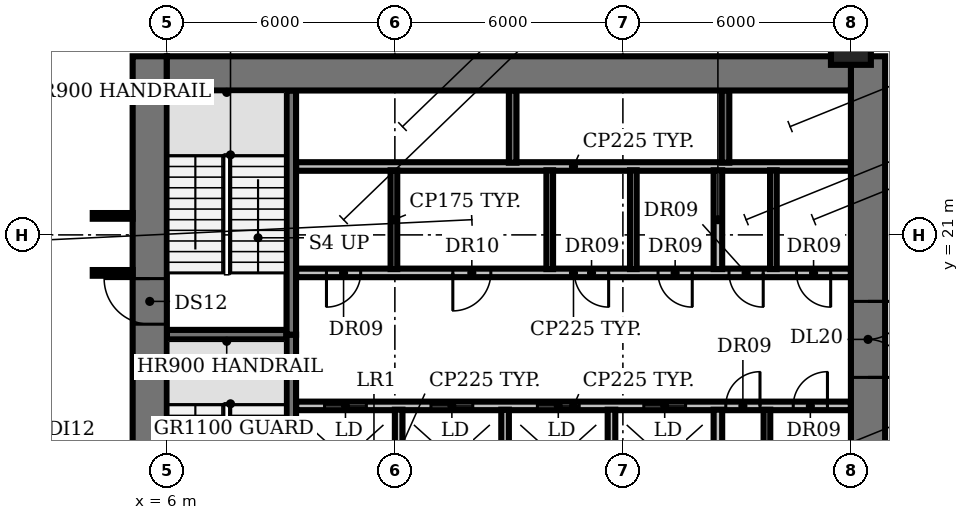
"""IFC4 building model, lengths in metres.
Left out: names, types, materials, properties, quantities, classifications, styles, units other than length and angle.
Written with IfcOpenShell. Run it as: python <this file> out.ifc"""

import sys

from ifc_helpers import new_model, si_unit, direction, frame, frame_2d, origin, origin_2d, place, context, subcontext, project, spatial, rectangle, circle, extrude, element, fill, save


model = new_model("IFC4")
c1 = context("Model", 3, precision=1e-05, world=origin(), true_north=direction((0.0, 1.0)))
c2 = subcontext(c1, "Body", "Model", "MODEL_VIEW")
j1 = project(units=[si_unit("LENGTHUNIT", "METRE"), si_unit("PLANEANGLEUNIT", "RADIAN")], contexts=[c1])
p1 = place(None, origin())
s1 = spatial("IfcSite", under=j1, at=p1, CompositionType="ELEMENT")
p2 = place(p1, origin())
s2 = spatial("IfcBuilding", under=s1, at=p2, CompositionType="ELEMENT")
p3 = place(p2, frame((0.0, 0.0, 66.8)))
s3 = spatial("IfcBuildingStorey", under=s2, at=p3, CompositionType="ELEMENT", Elevation=66.8)
p4 = place(p3, frame((24.0, 26.0, 0.0), z_axis=(0.0, 0.0, 1.0), x_axis=(1.0, 0.0, 0.0)))
e1 = element("IfcColumn", 1, at=p4, inside=s3, PredefinedType="COLUMN", context=c2, shape_type="SweptSolid", body=[
    extrude(circle(Radius=0.525, at=origin_2d()), origin(), (0.0, 0.0, 1.0), 3.85),
])
p5 = place(p3, frame((9.4, 16.5, 0.0), z_axis=(0.0, 0.0, 1.0), x_axis=(1.0, 0.0, 0.0)))
e2 = element("IfcWall", 2, at=p5, inside=s3, PredefinedType="PARTITIONING", context=c2, shape_type="SweptSolid", body=[
    extrude(rectangle(XDim=14.6, YDim=0.225, at=frame_2d((7.3, 0.0))), origin(), (0.0, 0.0, 1.0), 3.85),
])
p6 = place(p5, frame((0.75, 0.0, 0.0)))
e3 = element("IfcOpeningElement", 3, at=p6, cuts=e2, PredefinedType="OPENING", context=c2, shape_type="SweptSolid", body=[
    extrude(rectangle(XDim=1.1, YDim=2.1, at=frame_2d((0.55, 1.05))), frame((0.0, 0.123, 0.0), z_axis=(0.0, -1.0, 0.0), x_axis=(1.0, 0.0, 0.0)), (0.0, 0.0, 1.0), 0.245),
])
p7 = place(p5, frame((3.55, 0.0, 0.0)))
e4 = element("IfcOpeningElement", 4, at=p7, cuts=e2, PredefinedType="OPENING", context=c2, shape_type="SweptSolid", body=[
    extrude(rectangle(XDim=1.1, YDim=2.1, at=frame_2d((0.55, 1.05))), frame((0.0, 0.123, 0.0), z_axis=(0.0, -1.0, 0.0), x_axis=(1.0, 0.0, 0.0)), (0.0, 0.0, 1.0), 0.245),
])
p8 = place(p5, frame((6.35, 0.0, 0.0)))
e5 = element("IfcOpeningElement", 5, at=p8, cuts=e2, PredefinedType="OPENING", context=c2, shape_type="SweptSolid", body=[
    extrude(rectangle(XDim=1.1, YDim=2.1, at=frame_2d((0.55, 1.05))), frame((0.0, 0.123, 0.0), z_axis=(0.0, -1.0, 0.0), x_axis=(1.0, 0.0, 0.0)), (0.0, 0.0, 1.0), 0.245),
])
p9 = place(p5, frame((9.15, 0.0, 0.0)))
e6 = element("IfcOpeningElement", 6, at=p9, cuts=e2, PredefinedType="OPENING", context=c2, shape_type="SweptSolid", body=[
    extrude(rectangle(XDim=1.1, YDim=2.1, at=frame_2d((0.55, 1.05))), frame((0.0, 0.123, 0.0), z_axis=(0.0, -1.0, 0.0), x_axis=(1.0, 0.0, 0.0)), (0.0, 0.0, 1.0), 0.245),
])
p10 = place(p5, frame((11.308, 0.0, 0.0)))
e7 = element("IfcOpeningElement", 7, at=p10, cuts=e2, PredefinedType="OPENING", context=c2, shape_type="SweptSolid", body=[
    extrude(rectangle(XDim=0.9, YDim=2.1, at=frame_2d((0.45, 1.05))), frame((0.0, 0.123, 0.0), z_axis=(0.0, -1.0, 0.0), x_axis=(1.0, 0.0, 0.0)), (0.0, 0.0, 1.0), 0.245),
])
p11 = place(p5, frame((13.083, 0.0, 0.0)))
e8 = element("IfcOpeningElement", 8, at=p11, cuts=e2, PredefinedType="OPENING", context=c2, shape_type="SweptSolid", body=[
    extrude(rectangle(XDim=0.9, YDim=2.1, at=frame_2d((0.45, 1.05))), frame((0.0, 0.123, 0.0), z_axis=(0.0, -1.0, 0.0), x_axis=(1.0, 0.0, 0.0)), (0.0, 0.0, 1.0), 0.245),
])
p12 = place(p3, frame((6.0, 18.375, 0.0), z_axis=(0.0, 0.0, 1.0), x_axis=(1.0, 0.0, 0.0)))
e9 = element("IfcWall", 9, at=p12, inside=s3, PredefinedType="SHEAR", context=c2, shape_type="SweptSolid", body=[
    extrude(rectangle(XDim=3.15, YDim=0.25, at=frame_2d((1.575, 0.0))), origin(), (0.0, 0.0, 1.0), 3.85),
])
p13 = place(p3, frame((24.0, 20.0, 0.0), z_axis=(0.0, 0.0, 1.0), x_axis=(-1.0, 0.0, 0.0)))
e10 = element("IfcWall", 10, at=p13, inside=s3, PredefinedType="PARTITIONING", context=c2, shape_type="SweptSolid", body=[
    extrude(rectangle(XDim=14.6, YDim=0.225, at=frame_2d((7.3, 0.0))), origin(), (0.0, 0.0, 1.0), 3.85),
])
p14 = place(p13, frame((12.9, 0.0, 0.0)))
e11 = element("IfcOpeningElement", 11, at=p14, cuts=e10, PredefinedType="OPENING", context=c2, shape_type="SweptSolid", body=[
    extrude(rectangle(XDim=0.9, YDim=2.1, at=frame_2d((0.45, 1.05))), frame((0.0, 0.123, 0.0), z_axis=(0.0, -1.0, 0.0), x_axis=(1.0, 0.0, 0.0)), (0.0, 0.0, 1.0), 0.245),
])
p15 = place(p13, frame((9.475, 0.0, 0.0)))
e12 = element("IfcOpeningElement", 12, at=p15, cuts=e10, PredefinedType="OPENING", context=c2, shape_type="SweptSolid", body=[
    extrude(rectangle(XDim=1.0, YDim=2.1, at=frame_2d((0.5, 1.05))), frame((0.0, 0.123, 0.0), z_axis=(0.0, -1.0, 0.0), x_axis=(1.0, 0.0, 0.0)), (0.0, 0.0, 1.0), 0.245),
])
p16 = place(p13, frame((6.375, 0.0, 0.0)))
e13 = element("IfcOpeningElement", 13, at=p16, cuts=e10, PredefinedType="OPENING", context=c2, shape_type="SweptSolid", body=[
    extrude(rectangle(XDim=0.9, YDim=2.1, at=frame_2d((0.45, 1.05))), frame((0.0, 0.123, 0.0), z_axis=(0.0, -1.0, 0.0), x_axis=(1.0, 0.0, 0.0)), (0.0, 0.0, 1.0), 0.245),
])
p17 = place(p13, frame((4.175, 0.0, 0.0)))
e14 = element("IfcOpeningElement", 14, at=p17, cuts=e10, PredefinedType="OPENING", context=c2, shape_type="SweptSolid", body=[
    extrude(rectangle(XDim=0.9, YDim=2.1, at=frame_2d((0.45, 1.05))), frame((0.0, 0.123, 0.0), z_axis=(0.0, -1.0, 0.0), x_axis=(1.0, 0.0, 0.0)), (0.0, 0.0, 1.0), 0.245),
])
p18 = place(p13, frame((2.308, 0.0, 0.0)))
e15 = element("IfcOpeningElement", 15, at=p18, cuts=e10, PredefinedType="OPENING", context=c2, shape_type="SweptSolid", body=[
    extrude(rectangle(XDim=0.9, YDim=2.1, at=frame_2d((0.45, 1.05))), frame((0.0, 0.123, 0.0), z_axis=(0.0, -1.0, 0.0), x_axis=(1.0, 0.0, 0.0)), (0.0, 0.0, 1.0), 0.245),
])
p19 = place(p13, frame((0.532, 0.0, 0.0)))
e16 = element("IfcOpeningElement", 16, at=p19, cuts=e10, PredefinedType="OPENING", context=c2, shape_type="SweptSolid", body=[
    extrude(rectangle(XDim=0.9, YDim=2.1, at=frame_2d((0.45, 1.05))), frame((0.0, 0.123, 0.0), z_axis=(0.0, -1.0, 0.0), x_axis=(1.0, 0.0, 0.0)), (0.0, 0.0, 1.0), 0.245),
])
p20 = place(p3, frame((9.4, 22.8, 0.0), z_axis=(0.0, 0.0, 1.0), x_axis=(1.0, 0.0, 0.0)))
e17 = element("IfcWall", 17, at=p20, inside=s3, PredefinedType="PARTITIONING", context=c2, shape_type="SweptSolid", body=[
    extrude(rectangle(XDim=14.6, YDim=0.225, at=frame_2d((7.3, 0.0))), origin(), (0.0, 0.0, 1.0), 3.85),
])
p21 = place(p3, frame((9.275, 18.375, 0.0), z_axis=(0.0, 0.0, 1.0), x_axis=(0.0, -1.0, 0.0)))
e18 = element("IfcWall", 18, at=p21, inside=s3, PredefinedType="SHEAR", context=c2, shape_type="SweptSolid", body=[
    extrude(rectangle(XDim=6.55, YDim=0.25, at=frame_2d((3.275, 0.0))), origin(), (0.0, 0.0, 1.0), 3.85),
])
p22 = place(p21, frame((5.075, 0.0, 0.0)))
e19 = element("IfcOpeningElement", 19, at=p22, cuts=e18, PredefinedType="OPENING", context=c2, shape_type="SweptSolid", body=[
    extrude(rectangle(XDim=1.0, YDim=2.1, at=frame_2d((0.5, 1.05))), frame((0.0, 0.135, 0.0), z_axis=(0.0, -1.0, 0.0), x_axis=(1.0, 0.0, 0.0)), (0.0, 0.0, 1.0), 0.27),
])
p23 = place(p3, frame((9.275, 18.375, 0.0), z_axis=(0.0, 0.0, 1.0), x_axis=(0.0, 1.0, 0.0)))
e20 = element("IfcWall", 20, at=p23, inside=s3, PredefinedType="SHEAR", context=c2, shape_type="SweptSolid", body=[
    extrude(rectangle(XDim=6.425, YDim=0.25, at=frame_2d((3.212, 0.0))), origin(), (0.0, 0.0, 1.0), 3.85),
])
p24 = place(p3, frame((11.975, 20.1, 0.0), z_axis=(0.0, 0.0, 1.0), x_axis=(0.0, 1.0, 0.0)))
e21 = element("IfcWall", 21, at=p24, inside=s3, PredefinedType="PARTITIONING", context=c2, shape_type="SweptSolid", body=[
    extrude(rectangle(XDim=2.6, YDim=0.175, at=frame_2d((1.3, 0.0))), origin(), (0.0, 0.0, 1.0), 3.85),
])
for number, where, z_axis, x_axis in (
    (22, (12.1, 13.8, 0.0), (0.0, 0.0, 1.0), (0.0, 1.0, 0.0)),
    (23, (14.9, 13.8, 0.0), (0.0, 0.0, 1.0), (0.0, 1.0, 0.0)),
):
    element("IfcWall", number, at=place(p3, frame(where, z_axis=z_axis, x_axis=x_axis)), inside=s3, PredefinedType="SOLIDWALL", context=c2, shape_type="SweptSolid", body=[
        extrude(rectangle(XDim=2.6, YDim=0.2, at=frame_2d((1.3, 0.0))), origin(), (0.0, 0.0, 1.0), 3.85),
    ])
p25 = place(p3, frame((15.1, 22.9, 0.0), z_axis=(0.0, 0.0, 1.0), x_axis=(0.0, 1.0, 0.0)))
e24 = element("IfcWall", 24, at=p25, inside=s3, PredefinedType="SHEAR", context=c2, shape_type="SweptSolid", body=[
    extrude(rectangle(XDim=1.9, YDim=0.2, at=frame_2d((0.95, 0.0))), origin(), (0.0, 0.0, 1.0), 3.85),
])
p26 = place(p3, frame((16.075, 20.1, 0.0), z_axis=(0.0, 0.0, 1.0), x_axis=(0.0, 1.0, 0.0)))
e25 = element("IfcWall", 25, at=p26, inside=s3, PredefinedType="PARTITIONING", context=c2, shape_type="SweptSolid", body=[
    extrude(rectangle(XDim=2.6, YDim=0.175, at=frame_2d((1.3, 0.0))), origin(), (0.0, 0.0, 1.0), 3.85),
])
p27 = place(p3, frame((17.7, 13.8, 0.0), z_axis=(0.0, 0.0, 1.0), x_axis=(0.0, 1.0, 0.0)))
e26 = element("IfcWall", 26, at=p27, inside=s3, PredefinedType="SOLIDWALL", context=c2, shape_type="SweptSolid", body=[
    extrude(rectangle(XDim=2.6, YDim=0.2, at=frame_2d((1.3, 0.0))), origin(), (0.0, 0.0, 1.0), 3.85),
])
p28 = place(p3, frame((18.275, 20.1, 0.0), z_axis=(0.0, 0.0, 1.0), x_axis=(0.0, 1.0, 0.0)))
e27 = element("IfcWall", 27, at=p28, inside=s3, PredefinedType="PARTITIONING", context=c2, shape_type="SweptSolid", body=[
    extrude(rectangle(XDim=2.6, YDim=0.175, at=frame_2d((1.3, 0.0))), origin(), (0.0, 0.0, 1.0), 3.85),
])
for number, where, z_axis, x_axis in (
    (28, (20.5, 13.8, 0.0), (0.0, 0.0, 1.0), (0.0, 1.0, 0.0)),
    (29, (20.5, 20.1, 0.0), (0.0, 0.0, 1.0), (0.0, 1.0, 0.0)),
):
    element("IfcWall", number, at=place(p3, frame(where, z_axis=z_axis, x_axis=x_axis)), inside=s3, PredefinedType="PARTITIONING", context=c2, shape_type="SweptSolid", body=[
        extrude(rectangle(XDim=2.6, YDim=0.225, at=frame_2d((1.3, 0.0))), origin(), (0.0, 0.0, 1.0), 3.85),
    ])
p29 = place(p3, frame((20.7, 22.9, 0.0), z_axis=(0.0, 0.0, 1.0), x_axis=(0.0, 1.0, 0.0)))
e30 = element("IfcWall", 30, at=p29, inside=s3, PredefinedType="SHEAR", context=c2, shape_type="SweptSolid", body=[
    extrude(rectangle(XDim=1.9, YDim=0.2, at=frame_2d((0.95, 0.0))), origin(), (0.0, 0.0, 1.0), 3.85),
])
for number, where, z_axis, x_axis in (
    (31, (21.79, 13.8, 0.0), (0.0, 0.0, 1.0), (0.0, 1.0, 0.0)),
    (32, (21.96, 20.1, 0.0), (0.0, 0.0, 1.0), (0.0, 1.0, 0.0)),
):
    element("IfcWall", number, at=place(p3, frame(where, z_axis=z_axis, x_axis=x_axis)), inside=s3, PredefinedType="PARTITIONING", context=c2, shape_type="SweptSolid", body=[
        extrude(rectangle(XDim=2.6, YDim=0.175, at=frame_2d((1.3, 0.0))), origin(), (0.0, 0.0, 1.0), 3.85),
    ])
p30 = place(p3, frame((5.55, 4.5, 0.0), z_axis=(0.0, 0.0, 1.0), x_axis=(0.0, 1.0, 0.0)))
e33 = element("IfcWall", 33, at=p30, inside=s3, PredefinedType="SHEAR", context=c2, shape_type="SweptSolid", body=[
    extrude(rectangle(XDim=21.2, YDim=0.9, at=frame_2d((10.6, 0.0))), origin(), (0.0, 0.0, 1.0), 3.85),
])
p31 = place(p30, frame((1.15, 0.0, 0.0)))
e34 = element("IfcOpeningElement", 34, at=p31, cuts=e33, PredefinedType="OPENING", context=c2, shape_type="SweptSolid", body=[
    extrude(rectangle(XDim=1.5, YDim=2.1, at=frame_2d((0.75, 1.05))), frame((0.0, 0.46, 0.0), z_axis=(0.0, -1.0, 0.0), x_axis=(1.0, 0.0, 0.0)), (0.0, 0.0, 1.0), 0.92),
])
p32 = place(p30, frame((7.6, 0.0, 0.0)))
e35 = element("IfcOpeningElement", 35, at=p32, cuts=e33, PredefinedType="OPENING", context=c2, shape_type="SweptSolid", body=[
    extrude(rectangle(XDim=1.2, YDim=2.1, at=frame_2d((0.6, 1.05))), frame((0.0, 0.46, 0.0), z_axis=(0.0, -1.0, 0.0), x_axis=(1.0, 0.0, 0.0)), (0.0, 0.0, 1.0), 0.92),
])
p33 = place(p30, frame((14.15, 0.0, 0.0)))
e36 = element("IfcOpeningElement", 36, at=p33, cuts=e33, PredefinedType="OPENING", context=c2, shape_type="SweptSolid", body=[
    extrude(rectangle(XDim=1.2, YDim=2.1, at=frame_2d((0.6, 1.05))), frame((0.0, 0.46, 0.0), z_axis=(0.0, -1.0, 0.0), x_axis=(1.0, 0.0, 0.0)), (0.0, 0.0, 1.0), 0.92),
])
p34 = place(p3, frame((24.45, 25.7, 0.0), z_axis=(0.0, 0.0, 1.0), x_axis=(0.0, -1.0, 0.0)))
e37 = element("IfcWall", 37, at=p34, inside=s3, PredefinedType="SHEAR", context=c2, shape_type="SweptSolid", body=[
    extrude(rectangle(XDim=21.2, YDim=0.9, at=frame_2d((10.6, 0.0))), origin(), (0.0, 0.0, 1.0), 3.85),
])
p35 = place(p34, frame((18.55, 0.0, 0.0)))
e38 = element("IfcOpeningElement", 38, at=p35, cuts=e37, PredefinedType="OPENING", context=c2, shape_type="SweptSolid", body=[
    extrude(rectangle(XDim=1.5, YDim=2.1, at=frame_2d((0.75, 1.05))), frame((0.0, 0.46, 0.0), z_axis=(0.0, -1.0, 0.0), x_axis=(1.0, 0.0, 0.0)), (0.0, 0.0, 1.0), 0.92),
])
p36 = place(p34, frame((12.45, 0.0, 0.0)))
e39 = element("IfcOpeningElement", 39, at=p36, cuts=e37, PredefinedType="OPENING", context=c2, shape_type="SweptSolid", body=[
    extrude(rectangle(XDim=0.9, YDim=2.1, at=frame_2d((0.45, 1.05))), frame((0.0, 0.46, 0.0), z_axis=(0.0, -1.0, 0.0), x_axis=(1.0, 0.0, 0.0)), (0.0, 0.0, 1.0), 0.92),
])
p37 = place(p34, frame((6.45, 0.0, 0.0)))
e40 = element("IfcOpeningElement", 40, at=p37, cuts=e37, PredefinedType="OPENING", context=c2, shape_type="SweptSolid", body=[
    extrude(rectangle(XDim=2.0, YDim=2.1, at=frame_2d((1.0, 1.05))), frame((0.0, 0.46, 0.0), z_axis=(0.0, -1.0, 0.0), x_axis=(1.0, 0.0, 0.0)), (0.0, 0.0, 1.0), 0.92),
])
p38 = place(p3, frame((6.0, 25.25, 0.0), z_axis=(0.0, 0.0, 1.0), x_axis=(1.0, 0.0, 0.0)))
e41 = element("IfcWall", 41, at=p38, inside=s3, PredefinedType="SHEAR", context=c2, shape_type="SweptSolid", body=[
    extrude(rectangle(XDim=18.0, YDim=0.9, at=frame_2d((9.0, 0.0))), origin(), (0.0, 0.0, 1.0), 3.85),
])
for number, where, z_axis, x_axis in (
    (42, (4.05, 20.0, 0.0), (0.0, 0.0, 1.0), (1.0, 0.0, 0.0)),
    (43, (4.05, 21.5, 0.0), (0.0, 0.0, 1.0), (1.0, 0.0, 0.0)),
):
    element("IfcWall", number, at=place(p3, frame(where, z_axis=z_axis, x_axis=x_axis)), inside=s3, PredefinedType="PARTITIONING", context=c2, shape_type="SweptSolid", body=[
        extrude(rectangle(XDim=1.05, YDim=0.15, at=frame_2d((0.525, 0.0))), origin(), (0.0, 0.0, 1.0), 2.83),
    ])
p39 = place(p6, origin())
e44 = element("IfcDoor", 44, at=p39, inside=s3, OperationType="DOUBLE_DOOR_SLIDING", PredefinedType="DOOR", context=c2, shape_type="SweptSolid", body=[
    extrude(rectangle(XDim=1.1, YDim=2.1, at=frame_2d((0.55, 1.05))), frame((0.0, 0.025, 0.0), z_axis=(0.0, -1.0, 0.0), x_axis=(1.0, 0.0, 0.0)), (0.0, 0.0, 1.0), 0.05),
])
fill(e3, e44)
p40 = place(p7, origin())
e45 = element("IfcDoor", 45, at=p40, inside=s3, OperationType="DOUBLE_DOOR_SLIDING", PredefinedType="DOOR", context=c2, shape_type="SweptSolid", body=[
    extrude(rectangle(XDim=1.1, YDim=2.1, at=frame_2d((0.55, 1.05))), frame((0.0, 0.025, 0.0), z_axis=(0.0, -1.0, 0.0), x_axis=(1.0, 0.0, 0.0)), (0.0, 0.0, 1.0), 0.05),
])
fill(e4, e45)
p41 = place(p8, origin())
e46 = element("IfcDoor", 46, at=p41, inside=s3, OperationType="DOUBLE_DOOR_SLIDING", PredefinedType="DOOR", context=c2, shape_type="SweptSolid", body=[
    extrude(rectangle(XDim=1.1, YDim=2.1, at=frame_2d((0.55, 1.05))), frame((0.0, 0.025, 0.0), z_axis=(0.0, -1.0, 0.0), x_axis=(1.0, 0.0, 0.0)), (0.0, 0.0, 1.0), 0.05),
])
fill(e5, e46)
p42 = place(p9, origin())
e47 = element("IfcDoor", 47, at=p42, inside=s3, OperationType="DOUBLE_DOOR_SLIDING", PredefinedType="DOOR", context=c2, shape_type="SweptSolid", body=[
    extrude(rectangle(XDim=1.1, YDim=2.1, at=frame_2d((0.55, 1.05))), frame((0.0, 0.025, 0.0), z_axis=(0.0, -1.0, 0.0), x_axis=(1.0, 0.0, 0.0)), (0.0, 0.0, 1.0), 0.05),
])
fill(e6, e47)
p43 = place(p10, origin())
e48 = element("IfcDoor", 48, at=p43, inside=s3, OperationType="SINGLE_SWING_RIGHT", PredefinedType="DOOR", context=c2, shape_type="SweptSolid", body=[
    extrude(rectangle(XDim=0.9, YDim=2.1, at=frame_2d((0.45, 1.05))), frame((0.0, 0.025, 0.0), z_axis=(0.0, -1.0, 0.0), x_axis=(1.0, 0.0, 0.0)), (0.0, 0.0, 1.0), 0.05),
])
fill(e7, e48)
p44 = place(p11, origin())
e49 = element("IfcDoor", 49, at=p44, inside=s3, OperationType="SINGLE_SWING_RIGHT", PredefinedType="DOOR", context=c2, shape_type="SweptSolid", body=[
    extrude(rectangle(XDim=0.9, YDim=2.1, at=frame_2d((0.45, 1.05))), frame((0.0, 0.025, 0.0), z_axis=(0.0, -1.0, 0.0), x_axis=(1.0, 0.0, 0.0)), (0.0, 0.0, 1.0), 0.05),
])
fill(e8, e49)
p45 = place(p14, origin())
e50 = element("IfcDoor", 50, at=p45, inside=s3, OperationType="SINGLE_SWING_RIGHT", PredefinedType="DOOR", context=c2, shape_type="SweptSolid", body=[
    extrude(rectangle(XDim=0.9, YDim=2.1, at=frame_2d((0.45, 1.05))), frame((0.0, 0.025, 0.0), z_axis=(0.0, -1.0, 0.0), x_axis=(1.0, 0.0, 0.0)), (0.0, 0.0, 1.0), 0.05),
])
fill(e11, e50)
p46 = place(p15, origin())
e51 = element("IfcDoor", 51, at=p46, inside=s3, OperationType="SINGLE_SWING_RIGHT", PredefinedType="DOOR", context=c2, shape_type="SweptSolid", body=[
    extrude(rectangle(XDim=1.0, YDim=2.1, at=frame_2d((0.5, 1.05))), frame((0.0, 0.025, 0.0), z_axis=(0.0, -1.0, 0.0), x_axis=(1.0, 0.0, 0.0)), (0.0, 0.0, 1.0), 0.05),
])
fill(e12, e51)
p47 = place(p16, origin())
e52 = element("IfcDoor", 52, at=p47, inside=s3, OperationType="SINGLE_SWING_LEFT", PredefinedType="DOOR", context=c2, shape_type="SweptSolid", body=[
    extrude(rectangle(XDim=0.9, YDim=2.1, at=frame_2d((0.45, 1.05))), frame((0.0, 0.025, 0.0), z_axis=(0.0, -1.0, 0.0), x_axis=(1.0, 0.0, 0.0)), (0.0, 0.0, 1.0), 0.05),
])
fill(e13, e52)
p48 = place(p17, origin())
e53 = element("IfcDoor", 53, at=p48, inside=s3, OperationType="SINGLE_SWING_LEFT", PredefinedType="DOOR", context=c2, shape_type="SweptSolid", body=[
    extrude(rectangle(XDim=0.9, YDim=2.1, at=frame_2d((0.45, 1.05))), frame((0.0, 0.025, 0.0), z_axis=(0.0, -1.0, 0.0), x_axis=(1.0, 0.0, 0.0)), (0.0, 0.0, 1.0), 0.05),
])
fill(e14, e53)
p49 = place(p18, origin())
e54 = element("IfcDoor", 54, at=p49, inside=s3, OperationType="SINGLE_SWING_LEFT", PredefinedType="DOOR", context=c2, shape_type="SweptSolid", body=[
    extrude(rectangle(XDim=0.9, YDim=2.1, at=frame_2d((0.45, 1.05))), frame((0.0, 0.025, 0.0), z_axis=(0.0, -1.0, 0.0), x_axis=(1.0, 0.0, 0.0)), (0.0, 0.0, 1.0), 0.05),
])
fill(e15, e54)
p50 = place(p19, origin())
e55 = element("IfcDoor", 55, at=p50, inside=s3, OperationType="SINGLE_SWING_LEFT", PredefinedType="DOOR", context=c2, shape_type="SweptSolid", body=[
    extrude(rectangle(XDim=0.9, YDim=2.1, at=frame_2d((0.45, 1.05))), frame((0.0, 0.025, 0.0), z_axis=(0.0, -1.0, 0.0), x_axis=(1.0, 0.0, 0.0)), (0.0, 0.0, 1.0), 0.05),
])
fill(e16, e55)
p51 = place(p33, origin())
e56 = element("IfcDoor", 56, at=p51, inside=s3, OperationType="SINGLE_SWING_RIGHT", PredefinedType="DOOR", context=c2, shape_type="SweptSolid", body=[
    extrude(rectangle(XDim=1.2, YDim=2.1, at=frame_2d((0.6, 1.05))), frame((0.0, 0.025, 0.0), z_axis=(0.0, -1.0, 0.0), x_axis=(1.0, 0.0, 0.0)), (0.0, 0.0, 1.0), 0.05),
])
fill(e36, e56)
p52 = place(p37, origin())
e57 = element("IfcDoor", 57, at=p52, inside=s3, OperationType="DOUBLE_DOOR_SINGLE_SWING", PredefinedType="DOOR", context=c2, shape_type="SweptSolid", body=[
    extrude(rectangle(XDim=2.0, YDim=2.1, at=frame_2d((1.0, 1.05))), frame((0.0, 0.025, 0.0), z_axis=(0.0, -1.0, 0.0), x_axis=(1.0, 0.0, 0.0)), (0.0, 0.0, 1.0), 0.05),
])
fill(e40, e57)
save(model, sys.argv[1])
